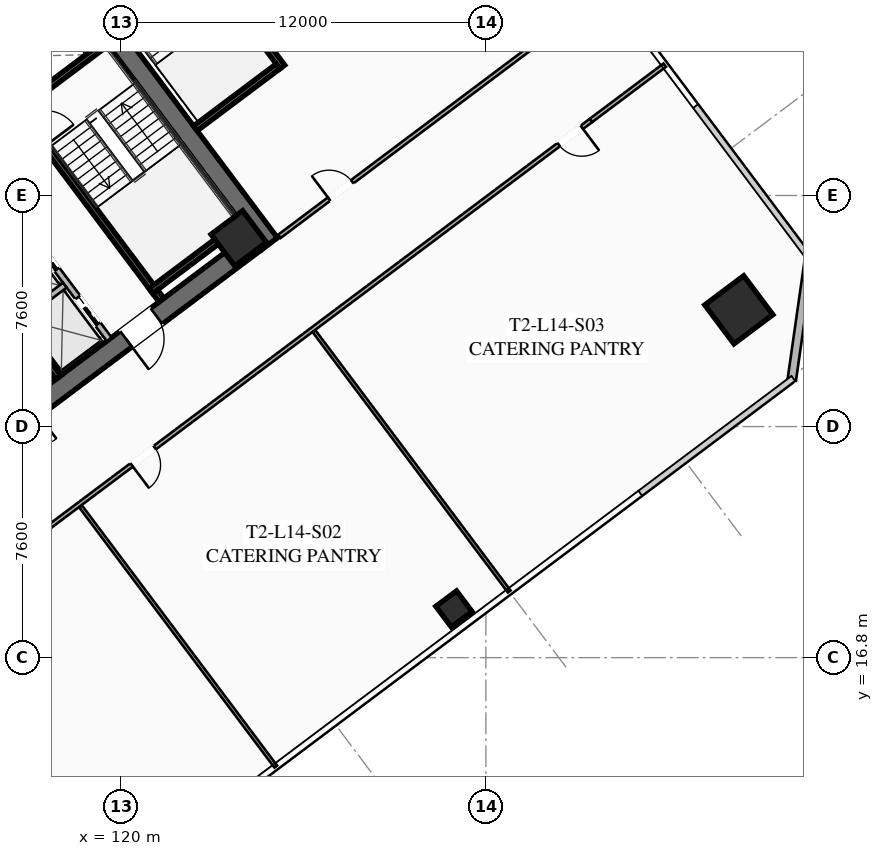
"""IFC4 building model, lengths in metres.
Left out: names, types, materials, properties, quantities, classifications, styles, units other than length and angle.
Written with IfcOpenShell. Run it as: python <this file> out.ifc"""

import sys

from ifc_helpers import new_model, si_unit, direction, frame, frame_2d, origin, origin_2d, place, context, subcontext, project, spatial, rectangle, hollow_rectangle, extrude, element, fill, save


model = new_model("IFC4")
c1 = context("Model", 3, precision=1e-05, world=origin(), true_north=direction((0.0, 1.0)))
c2 = subcontext(c1, "Body", "Model", "MODEL_VIEW")
j1 = project(units=[si_unit("LENGTHUNIT", "METRE"), si_unit("PLANEANGLEUNIT", "RADIAN")], contexts=[c1])
p1 = place(None, origin())
s1 = spatial("IfcSite", under=j1, at=p1, CompositionType="ELEMENT")
p2 = place(p1, origin())
s2 = spatial("IfcBuilding", under=s1, at=p2, CompositionType="ELEMENT")
p3 = place(p2, frame((0.0, 0.0, 56.55)))
s3 = spatial("IfcBuildingStorey", under=s2, at=p3, CompositionType="ELEMENT", Elevation=56.55)
p4 = place(p3, frame((115.524, 42.893, 0.0), z_axis=(0.0, 0.0, 1.0), x_axis=(0.600005007985, -0.799996243986, 0.0)))
e1 = element("IfcWall", 1, at=p4, inside=s3, PredefinedType="SHEAR", context=c2, shape_type="SweptSolid", body=[
    extrude(rectangle(XDim=15.6, YDim=0.65, at=frame_2d((7.8, 0.0))), origin(), (0.0, 0.0, 1.0), 3.55),
])
p5 = place(p3, frame((124.429, 30.478, 0.0), z_axis=(0.0, 0.0, 1.0), x_axis=(-0.799998028465, -0.600002628705, 0.0)))
e2 = element("IfcWall", 2, at=p5, inside=s3, PredefinedType="SHEAR", context=c2, shape_type="SweptSolid", body=[
    extrude(rectangle(XDim=14.86, YDim=0.65, at=frame_2d((7.43, 0.0))), origin(), (0.0, 0.0, 1.0), 3.55),
])
p6 = place(p5, frame((9.13, 0.0, 0.0)))
e3 = element("IfcOpeningElement", 3, at=p6, cuts=e2, PredefinedType="OPENING", context=c2, shape_type="SweptSolid", body=[
    extrude(rectangle(XDim=1.25, YDim=2.25, at=frame_2d((0.625, 1.125))), frame((0.0, 0.335, 0.0), z_axis=(0.0, -1.0, 0.0), x_axis=(1.0, 0.0, 0.0)), (0.0, 0.0, 1.0), 0.67),
])
p7 = place(p5, frame((4.08, 0.0, 0.0)))
e4 = element("IfcOpeningElement", 4, at=p7, cuts=e2, PredefinedType="OPENING", context=c2, shape_type="SweptSolid", body=[
    extrude(rectangle(XDim=1.25, YDim=2.25, at=frame_2d((0.625, 1.125))), frame((0.0, 0.335, 0.0), z_axis=(0.0, -1.0, 0.0), x_axis=(1.0, 0.0, 0.0)), (0.0, 0.0, 1.0), 0.67),
])
p8 = place(p3, frame((123.87, 30.59, 0.0), z_axis=(0.0, 0.0, 1.0), x_axis=(0.799999996291, 0.600000004945, 0.0)))
e5 = element("IfcColumn", 5, at=p8, inside=s3, PredefinedType="COLUMN", context=c2, shape_type="SweptSolid", body=[
    extrude(hollow_rectangle(XDim=1.3, YDim=1.3, WallThickness=0.05, at=origin_2d()), origin(), (0.0, 0.0, 1.0), 3.35),
])
p9 = place(p3, frame((140.32, 28.24, 0.0), z_axis=(0.0, 0.0, 1.0), x_axis=(0.799999996291, 0.600000004945, 0.0)))
e6 = element("IfcColumn", 6, at=p9, inside=s3, PredefinedType="COLUMN", context=c2, shape_type="SweptSolid", body=[
    extrude(hollow_rectangle(XDim=1.6, YDim=1.6, WallThickness=0.06, at=origin_2d()), origin(), (0.0, 0.0, 1.0), 3.35),
])
p10 = place(p3, frame((130.95, 18.4, 0.0), z_axis=(0.0, 0.0, 1.0), x_axis=(0.799999996291, 0.600000004945, 0.0)))
e7 = element("IfcColumn", 7, at=p10, inside=s3, PredefinedType="COLUMN", context=c2, shape_type="SweptSolid", body=[
    extrude(hollow_rectangle(XDim=0.85, YDim=0.85, WallThickness=0.035, at=origin_2d()), origin(), (0.0, 0.0, 1.0), 3.35),
])
p11 = place(p3, frame((142.64, 29.98, 0.0), z_axis=(0.0, 0.0, 1.0), x_axis=(-0.14137968631, -0.989955445613, 0.0)))
e8 = element("IfcWall", 8, at=p11, inside=s3, PredefinedType="SOLIDWALL", context=c2, shape_type="SweptSolid", body=[
    extrude(rectangle(XDim=4.101, YDim=0.28, at=frame_2d((2.051, 0.0))), origin(), (0.0, 0.0, 1.0), 3.35),
])
p12 = place(p3, frame((116.56, 34.92, 0.0), z_axis=(0.0, 0.0, 1.0), x_axis=(0.600009827119, -0.799992629566, 0.0)))
e9 = element("IfcWall", 9, at=p12, inside=s3, PredefinedType="SHEAR", context=c2, shape_type="SweptSolid", body=[
    extrude(rectangle(XDim=7.95, YDim=0.2, at=frame_2d((3.975, 0.0))), origin(), (0.0, 0.0, 1.0), 3.35),
])
p13 = place(p12, frame((0.45, 0.0, 0.0)))
e10 = element("IfcOpeningElement", 10, at=p13, cuts=e9, PredefinedType="OPENING", context=c2, shape_type="SweptSolid", body=[
    extrude(rectangle(XDim=1.15, YDim=2.2, at=frame_2d((0.575, 1.1))), frame((0.0, 0.11, 0.0), z_axis=(0.0, -1.0, 0.0), x_axis=(1.0, 0.0, 0.0)), (0.0, 0.0, 1.0), 0.22),
])
for number, where, z_axis, x_axis in (
    (11, (116.54, 34.78, 0.0), (0.0, 0.0, 1.0), (0.8, 0.6, 0.0)),
    (12, (120.98, 28.86, 0.0), (0.0, 0.0, 1.0), (0.8, 0.6, 0.0)),
):
    element("IfcWall", number, at=place(p3, frame(where, z_axis=z_axis, x_axis=x_axis)), inside=s3, PredefinedType="SHEAR", context=c2, shape_type="SweptSolid", body=[
        extrude(rectangle(XDim=3.73, YDim=0.2, at=frame_2d((1.865, 0.0))), origin(), (0.0, 0.0, 1.0), 3.35),
    ])
p14 = place(p3, frame((117.938, 26.016, 0.0), z_axis=(0.0, 0.0, 1.0), x_axis=(-0.600005463273, 0.799995902516, 0.0)))
e13 = element("IfcWall", 13, at=p14, inside=s3, PredefinedType="SHEAR", context=c2, shape_type="SweptSolid", body=[
    extrude(rectangle(XDim=14.3, YDim=0.2, at=frame_2d((7.15, 0.0))), origin(), (0.0, 0.0, 1.0), 3.35),
])
p15 = place(p3, frame((115.59, 36.63, 0.0), z_axis=(0.0, 0.0, 1.0), x_axis=(0.799973995579, 0.600034670996, 0.0)))
e14 = element("IfcWall", 14, at=p15, inside=s3, PredefinedType="SOLIDWALL", context=c2, shape_type="SweptSolid", body=[
    extrude(rectangle(XDim=3.38, YDim=0.2, at=frame_2d((1.69, 0.0))), origin(), (0.0, 0.0, 1.0), 3.35),
])
p16 = place(p3, frame((119.61, 27.27, 0.0), z_axis=(0.0, 0.0, 1.0), x_axis=(-0.600011488909, 0.79999138319, 0.0)))
e15 = element("IfcWall", 15, at=p16, inside=s3, PredefinedType="SOLIDWALL", context=c2, shape_type="SweptSolid", body=[
    extrude(rectangle(XDim=6.8, YDim=0.2, at=frame_2d((3.4, 0.0))), origin(), (0.0, 0.0, 1.0), 3.35),
])
p17 = place(p16, frame((0.625, 0.0, 0.0)))
e16 = element("IfcOpeningElement", 16, at=p17, cuts=e15, PredefinedType="OPENING", context=c2, shape_type="SweptSolid", body=[
    extrude(rectangle(XDim=1.1, YDim=2.2, at=frame_2d((0.55, 1.1))), frame((0.0, 0.11, 0.0), z_axis=(0.0, -1.0, 0.0), x_axis=(1.0, 0.0, 0.0)), (0.0, 0.0, 1.0), 0.22),
])
p18 = place(p16, frame((2.875, 0.0, 0.0)))
e17 = element("IfcOpeningElement", 17, at=p18, cuts=e15, PredefinedType="OPENING", context=c2, shape_type="SweptSolid", body=[
    extrude(rectangle(XDim=1.1, YDim=2.2, at=frame_2d((0.55, 1.1))), frame((0.0, 0.11, 0.0), z_axis=(0.0, -1.0, 0.0), x_axis=(1.0, 0.0, 0.0)), (0.0, 0.0, 1.0), 0.22),
])
p19 = place(p16, frame((5.125, 0.0, 0.0)))
e18 = element("IfcOpeningElement", 18, at=p19, cuts=e15, PredefinedType="OPENING", context=c2, shape_type="SweptSolid", body=[
    extrude(rectangle(XDim=1.1, YDim=2.2, at=frame_2d((0.55, 1.1))), frame((0.0, 0.11, 0.0), z_axis=(0.0, -1.0, 0.0), x_axis=(1.0, 0.0, 0.0)), (0.0, 0.0, 1.0), 0.22),
])
p20 = place(p3, frame((116.646, 27.922, 0.0), z_axis=(0.0, 0.0, 1.0), x_axis=(0.8, 0.6, 0.0)))
e19 = element("IfcWall", 19, at=p20, inside=s3, PredefinedType="SOLIDWALL", context=c2, shape_type="SweptSolid", body=[
    extrude(rectangle(XDim=1.88, YDim=0.2, at=frame_2d((0.94, 0.0))), origin(), (0.0, 0.0, 1.0), 3.35),
])
p21 = place(p3, frame((125.304, 36.228, 0.0), z_axis=(0.0, 0.0, 1.0), x_axis=(-0.59998851072, 0.800008616831, 0.0)))
e20 = element("IfcWall", 20, at=p21, inside=s3, PredefinedType="SHEAR", context=c2, shape_type="SweptSolid", body=[
    extrude(rectangle(XDim=6.8, YDim=0.2, at=frame_2d((3.4, 0.0))), origin(), (0.0, 0.0, 1.0), 3.35),
])
p22 = place(p3, frame((122.444, 34.208, 0.0), z_axis=(0.0, 0.0, 1.0), x_axis=(0.79999138319, 0.600011488909, 0.0)))
e21 = element("IfcWall", 21, at=p22, inside=s3, PredefinedType="SHEAR", context=c2, shape_type="SweptSolid", body=[
    extrude(rectangle(XDim=3.4, YDim=0.2, at=frame_2d((1.7, 0.0))), origin(), (0.0, 0.0, 1.0), 3.35),
])
p23 = place(p3, frame((98.174, 34.468, 0.0), z_axis=(0.0, 0.0, 1.0), x_axis=(0.800000982127, 0.599998690494, 0.0)))
e22 = element("IfcWall", 22, at=p23, inside=s3, PredefinedType="PARTITIONING", context=c2, shape_type="SweptSolid", body=[
    extrude(rectangle(XDim=29.83, YDim=0.135, at=frame_2d((14.915, 0.0))), origin(), (0.0, 0.0, 1.0), 2.703),
])
p24 = place(p23, frame((0.3, 0.0, 0.0)))
e23 = element("IfcOpeningElement", 23, at=p24, cuts=e22, PredefinedType="OPENING", context=c2, shape_type="SweptSolid", body=[
    extrude(rectangle(XDim=0.95, YDim=2.05, at=frame_2d((0.475, 1.025))), frame((0.0, 0.077, 0.0), z_axis=(0.0, -1.0, 0.0), x_axis=(1.0, 0.0, 0.0)), (0.0, 0.0, 1.0), 0.155),
])
p25 = place(p23, frame((10.913, 0.0, 0.0)))
e24 = element("IfcOpeningElement", 24, at=p25, cuts=e22, PredefinedType="OPENING", context=c2, shape_type="SweptSolid", body=[
    extrude(rectangle(XDim=0.95, YDim=2.05, at=frame_2d((0.475, 1.025))), frame((0.0, 0.077, 0.0), z_axis=(0.0, -1.0, 0.0), x_axis=(1.0, 0.0, 0.0)), (0.0, 0.0, 1.0), 0.155),
])
p26 = place(p23, frame((28.58, 0.0, 0.0)))
e25 = element("IfcOpeningElement", 25, at=p26, cuts=e22, PredefinedType="OPENING", context=c2, shape_type="SweptSolid", body=[
    extrude(rectangle(XDim=0.95, YDim=2.05, at=frame_2d((0.475, 1.025))), frame((0.0, 0.077, 0.0), z_axis=(0.0, -1.0, 0.0), x_axis=(1.0, 0.0, 0.0)), (0.0, 0.0, 1.0), 0.155),
])
p27 = place(p3, frame((135.46, 34.47, 0.0), z_axis=(0.0, 0.0, 1.0), x_axis=(-0.800000982127, -0.599998690494, 0.0)))
e26 = element("IfcWall", 26, at=p27, inside=s3, PredefinedType="PARTITIONING", context=c2, shape_type="SweptSolid", body=[
    extrude(rectangle(XDim=29.83, YDim=0.135, at=frame_2d((14.915, 0.0))), origin(), (0.0, 0.0, 1.0), 2.703),
])
p28 = place(p27, frame((28.5, 0.0, 0.0)))
e27 = element("IfcOpeningElement", 27, at=p28, cuts=e26, PredefinedType="OPENING", context=c2, shape_type="SweptSolid", body=[
    extrude(rectangle(XDim=0.95, YDim=2.05, at=frame_2d((0.475, 1.025))), frame((0.0, 0.077, 0.0), z_axis=(0.0, -1.0, 0.0), x_axis=(1.0, 0.0, 0.0)), (0.0, 0.0, 1.0), 0.155),
])
p29 = place(p27, frame((17.938, 0.0, 0.0)))
e28 = element("IfcOpeningElement", 28, at=p29, cuts=e26, PredefinedType="OPENING", context=c2, shape_type="SweptSolid", body=[
    extrude(rectangle(XDim=0.95, YDim=2.05, at=frame_2d((0.475, 1.025))), frame((0.0, 0.077, 0.0), z_axis=(0.0, -1.0, 0.0), x_axis=(1.0, 0.0, 0.0)), (0.0, 0.0, 1.0), 0.155),
])
p30 = place(p27, frame((0.38, 0.0, 0.0)))
e29 = element("IfcOpeningElement", 29, at=p30, cuts=e26, PredefinedType="OPENING", context=c2, shape_type="SweptSolid", body=[
    extrude(rectangle(XDim=0.95, YDim=2.05, at=frame_2d((0.475, 1.025))), frame((0.0, 0.077, 0.0), z_axis=(0.0, -1.0, 0.0), x_axis=(1.0, 0.0, 0.0)), (0.0, 0.0, 1.0), 0.155),
])
p31 = place(p3, frame((135.46, 34.47, 0.0), z_axis=(0.0, 0.0, 1.0), x_axis=(0.799990331366, 0.600012891296, 0.0)))
e30 = element("IfcWall", 30, at=p31, inside=s3, PredefinedType="PARTITIONING", context=c2, shape_type="SweptSolid", body=[
    extrude(rectangle(XDim=3.03, YDim=0.135, at=frame_2d((1.515, 0.0))), origin(), (0.0, 0.0, 1.0), 2.703),
])
p32 = place(p3, frame((125.088, 13.216, 0.0), z_axis=(0.0, 0.0, 1.0), x_axis=(-0.600003650761, 0.799997261916, 0.0)))
e31 = element("IfcWall", 31, at=p32, inside=s3, PredefinedType="PARTITIONING", context=c2, shape_type="SweptSolid", body=[
    extrude(rectangle(XDim=10.7, YDim=0.11, at=frame_2d((5.35, 0.0))), origin(), (0.0, 0.0, 1.0), 2.703),
])
p33 = place(p3, frame((132.768, 18.976, 0.0), z_axis=(0.0, 0.0, 1.0), x_axis=(-0.600018253432, 0.799986309601, 0.0)))
e32 = element("IfcWall", 32, at=p33, inside=s3, PredefinedType="PARTITIONING", context=c2, shape_type="SweptSolid", body=[
    extrude(rectangle(XDim=10.7, YDim=0.11, at=frame_2d((5.35, 0.0))), origin(), (0.0, 0.0, 1.0), 2.703),
])
p34 = place(p3, frame((125.208, 30.656, 0.0), z_axis=(0.0, 0.0, 1.0), x_axis=(0.799995666112, 0.600005778473, 0.0)))
e33 = element("IfcWall", 33, at=p34, inside=s3, PredefinedType="PARTITIONING", context=c2, shape_type="SweptSolid", body=[
    extrude(rectangle(XDim=13.52, YDim=0.135, at=frame_2d((6.76, 0.0))), origin(), (0.0, 0.0, 1.0), 2.703),
])
p35 = place(p34, frame((2.045, 0.0, 0.0)))
e34 = element("IfcOpeningElement", 34, at=p35, cuts=e33, PredefinedType="OPENING", context=c2, shape_type="SweptSolid", body=[
    extrude(rectangle(XDim=0.95, YDim=2.05, at=frame_2d((0.475, 1.025))), frame((0.0, 0.077, 0.0), z_axis=(0.0, -1.0, 0.0), x_axis=(1.0, 0.0, 0.0)), (0.0, 0.0, 1.0), 0.155),
])
p36 = place(p7, origin())
e35 = element("IfcDoor", 35, at=p36, inside=s3, OperationType="SINGLE_SWING_RIGHT", PredefinedType="DOOR", context=c2, shape_type="SweptSolid", body=[
    extrude(rectangle(XDim=1.25, YDim=2.25, at=frame_2d((0.625, 1.125))), frame((0.0, 0.025, 0.0), z_axis=(0.0, -1.0, 0.0), x_axis=(1.0, 0.0, 0.0)), (0.0, 0.0, 1.0), 0.05),
])
fill(e4, e35)
p37 = place(p29, origin())
e36 = element("IfcDoor", 36, at=p37, inside=s3, OperationType="SINGLE_SWING_RIGHT", PredefinedType="DOOR", context=c2, shape_type="SweptSolid", body=[
    extrude(rectangle(XDim=0.95, YDim=2.05, at=frame_2d((0.475, 1.025))), frame((0.0, 0.025, 0.0), z_axis=(0.0, -1.0, 0.0), x_axis=(1.0, 0.0, 0.0)), (0.0, 0.0, 1.0), 0.05),
])
fill(e28, e36)
p38 = place(p30, origin())
e37 = element("IfcDoor", 37, at=p38, inside=s3, OperationType="SINGLE_SWING_LEFT", PredefinedType="DOOR", context=c2, shape_type="SweptSolid", body=[
    extrude(rectangle(XDim=0.95, YDim=2.05, at=frame_2d((0.475, 1.025))), frame((0.0, 0.025, 0.0), z_axis=(0.0, -1.0, 0.0), x_axis=(1.0, 0.0, 0.0)), (0.0, 0.0, 1.0), 0.05),
])
fill(e29, e37)
p39 = place(p35, origin())
e38 = element("IfcDoor", 38, at=p39, inside=s3, OperationType="SINGLE_SWING_LEFT", PredefinedType="DOOR", context=c2, shape_type="SweptSolid", body=[
    extrude(rectangle(XDim=0.95, YDim=2.05, at=frame_2d((0.475, 1.025))), frame((0.0, 0.025, 0.0), z_axis=(0.0, -1.0, 0.0), x_axis=(1.0, 0.0, 0.0)), (0.0, 0.0, 1.0), 0.05),
])
fill(e34, e38)
p40 = place(p17, origin())
e39 = element("IfcDoor", 39, at=p40, inside=s3, OperationType="SLIDING_TO_LEFT", PredefinedType="DOOR", context=c2, shape_type="SweptSolid", body=[
    extrude(rectangle(XDim=1.1, YDim=2.2, at=frame_2d((0.55, 1.1))), frame((0.0, 0.025, 0.0), z_axis=(0.0, -1.0, 0.0), x_axis=(1.0, 0.0, 0.0)), (0.0, 0.0, 1.0), 0.05),
])
fill(e16, e39)
p41 = place(p18, origin())
e40 = element("IfcDoor", 40, at=p41, inside=s3, OperationType="SLIDING_TO_LEFT", PredefinedType="DOOR", context=c2, shape_type="SweptSolid", body=[
    extrude(rectangle(XDim=1.1, YDim=2.2, at=frame_2d((0.55, 1.1))), frame((0.0, 0.025, 0.0), z_axis=(0.0, -1.0, 0.0), x_axis=(1.0, 0.0, 0.0)), (0.0, 0.0, 1.0), 0.05),
])
fill(e17, e40)
save(model, sys.argv[1])
